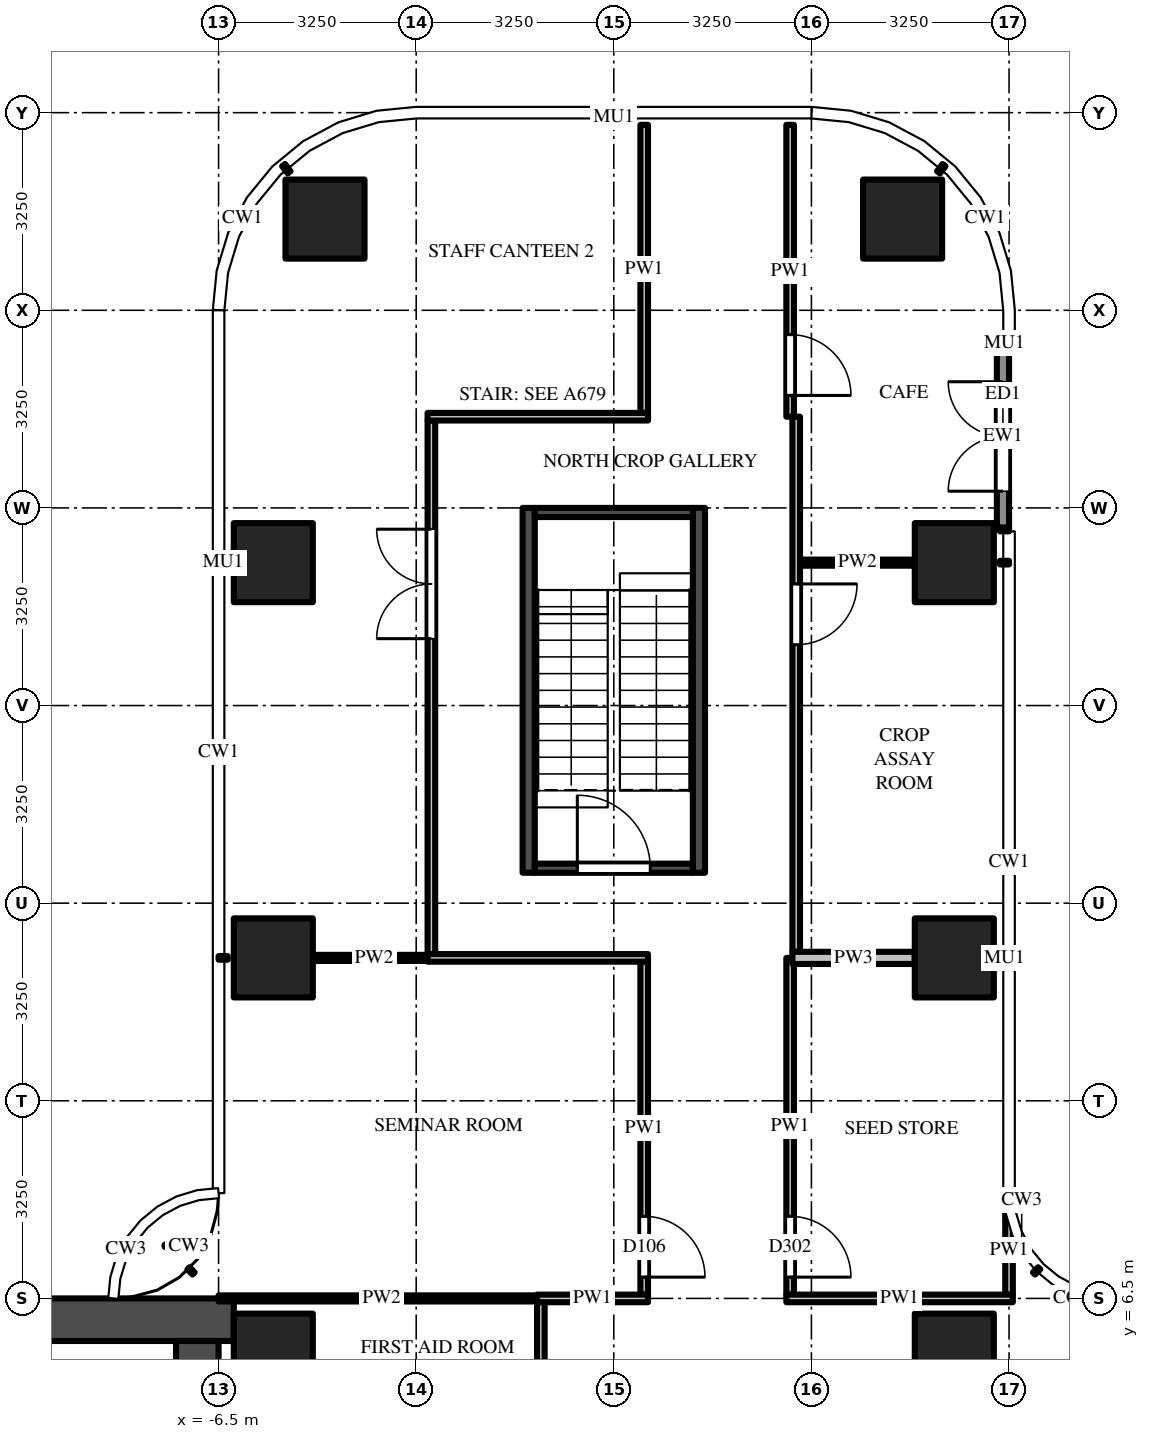
"""IFC4 building model, lengths in metres.
Left out: names, types, materials, properties, quantities, classifications, styles, units other than length and angle.
Written with IfcOpenShell. Run it as: python <this file> out.ifc"""

import sys

from ifc_helpers import new_model, si_unit, direction, frame, frame_2d, origin, origin_2d, place, context, subcontext, project, spatial, polyline, rectangle, outline, extrude, source, transform, mapped, element, fill, save


model = new_model("IFC4")
c1 = context("Model", 3, precision=1e-05, world=origin(), true_north=direction((0.0, 1.0)))
c2 = subcontext(c1, "Body", "Model", "MODEL_VIEW")
j1 = project(units=[si_unit("LENGTHUNIT", "METRE"), si_unit("PLANEANGLEUNIT", "RADIAN")], contexts=[c1])
p1 = place(None, origin())
s1 = spatial("IfcSite", under=j1, at=p1, CompositionType="ELEMENT")
p2 = place(p1, origin())
s2 = spatial("IfcBuilding", under=s1, at=p2, CompositionType="ELEMENT")
p3 = place(p2, frame((0.0, 0.0, 129.0)))
s3 = spatial("IfcBuildingStorey", under=s2, at=p3, CompositionType="ELEMENT", Elevation=129.0)
m1 = source(origin(), c2, "Body", "SweptSolid", [
    extrude(rectangle(XDim=1.3, YDim=1.3, at=origin_2d()), origin(), (0.0, 0.0, 1.0), 4.5),
])
for number, where, z_axis, x_axis in (
    (1, (-5.6, 12.1, 0.0), (0.0, 0.0, 1.0), (1.0, 0.0, 0.0)),
    (2, (-5.6, 18.6, 0.0), (0.0, 0.0, 1.0), (1.0, 0.0, 0.0)),
    (3, (-4.75, 24.25, 0.0), (0.0, 0.0, 1.0), (1.0, 0.0, 0.0)),
    (4, (5.6, 12.1, 0.0), (0.0, 0.0, 1.0), (1.0, 0.0, 0.0)),
    (5, (5.6, 18.6, 0.0), (0.0, 0.0, 1.0), (1.0, 0.0, 0.0)),
    (6, (4.75, 24.25, 0.0), (0.0, 0.0, 1.0), (1.0, 0.0, 0.0)),
    (7, (5.6, 5.6, 0.0), (0.0, 0.0, 1.0), (1.0, 0.0, 0.0)),
    (8, (-5.6, 5.6, 0.0), (0.0, 0.0, 1.0), (1.0, 0.0, 0.0)),
):
    element("IfcColumn", number, at=place(p3, frame(where, z_axis=z_axis, x_axis=x_axis)), inside=s3, PredefinedType="COLUMN", context=c2, shape_type="MappedRepresentation", body=[
        mapped(m1, transform((0.0, 0.0, 0.0))),
    ])
m2 = source(origin(), c2, "Body", "SweptSolid", [
    extrude(rectangle(XDim=16.5, YDim=0.7, at=frame_2d((8.25, 0.0))), origin(), (0.0, 0.0, 1.0), 4.25),
])
p4 = place(p3, frame((-6.25, 6.15, 0.0), z_axis=(0.0, 0.0, 1.0), x_axis=(-1.0, 0.0, 0.0)))
e9 = element("IfcWall", 9, at=p4, inside=s3, PredefinedType="SHEAR", context=c2, shape_type="MappedRepresentation", body=[
    mapped(m2, transform((0.0, 0.0, 0.0))),
])
m3 = source(origin(), c2, "Body", "SweptSolid", [
    extrude(rectangle(XDim=9.05, YDim=0.7, at=frame_2d((4.525, 0.0))), origin(), (0.0, 0.0, 1.0), 4.25),
])
p5 = place(p3, frame((-6.85, 5.8, 0.0), z_axis=(0.0, 0.0, 1.0), x_axis=(0.0, -1.0, 0.0)))
e10 = element("IfcWall", 10, at=p5, inside=s3, PredefinedType="SHEAR", context=c2, shape_type="MappedRepresentation", body=[
    mapped(m3, transform((0.0, 0.0, 0.0))),
])
m4 = source(origin(), c2, "Body", "SweptSolid", [
    extrude(rectangle(XDim=1.8, YDim=2.1, at=frame_2d((0.9, 1.05))), frame((0.0, 0.36, 0.0), z_axis=(0.0, -1.0, 0.0), x_axis=(1.0, 0.0, 0.0)), (0.0, 0.0, 1.0), 0.72),
])
p6 = place(p5, frame((3.15, 0.0, 0.0)))
e11 = element("IfcOpeningElement", 11, at=p6, cuts=e10, PredefinedType="OPENING", context=c2, shape_type="MappedRepresentation", body=[
    mapped(m4, transform((0.0, 0.0, 0.0))),
])
m5 = source(origin(), c2, "Body", "SweptSolid", [
    extrude(rectangle(XDim=6.0, YDim=0.2, at=frame_2d((3.0, 0.0))), origin(), (0.0, 0.0, 1.0), 4.25),
])
for number, where, z_axis, x_axis in (
    (12, (-1.4, 13.5, 0.0), (0.0, 0.0, 1.0), (0.0, 1.0, 0.0)),
    (13, (1.4, 13.5, 0.0), (0.0, 0.0, 1.0), (0.0, 1.0, 0.0)),
):
    element("IfcWall", number, at=place(p3, frame(where, z_axis=z_axis, x_axis=x_axis)), inside=s3, PredefinedType="SHEAR", context=c2, shape_type="MappedRepresentation", body=[
        mapped(m5, transform((0.0, 0.0, 0.0))),
    ])
m6 = source(origin(), c2, "Body", "SweptSolid", [
    extrude(rectangle(XDim=2.6, YDim=0.15, at=frame_2d((1.3, 0.0))), origin(), (0.0, 0.0, 1.0), 4.25),
])
p7 = place(p3, frame((-1.3, 13.575, 0.0), z_axis=(0.0, 0.0, 1.0), x_axis=(1.0, 0.0, 0.0)))
e14 = element("IfcWall", 14, at=p7, inside=s3, PredefinedType="SHEAR", context=c2, shape_type="MappedRepresentation", body=[
    mapped(m6, transform((0.0, 0.0, 0.0))),
])
m7 = source(origin(), c2, "Body", "SweptSolid", [
    extrude(rectangle(XDim=1.2, YDim=2.1, at=frame_2d((0.6, 1.05))), frame((0.0, 0.085, 0.0), z_axis=(0.0, -1.0, 0.0), x_axis=(1.0, 0.0, 0.0)), (0.0, 0.0, 1.0), 0.17),
])
p8 = place(p7, frame((0.7, 0.0, 0.0)))
e15 = element("IfcOpeningElement", 15, at=p8, cuts=e14, PredefinedType="OPENING", context=c2, shape_type="MappedRepresentation", body=[
    mapped(m7, transform((0.0, 0.0, 0.0))),
])
p9 = place(p3, frame((-1.3, 19.425, 0.0), z_axis=(0.0, 0.0, 1.0), x_axis=(1.0, 0.0, 0.0)))
e16 = element("IfcWall", 16, at=p9, inside=s3, PredefinedType="SHEAR", context=c2, shape_type="MappedRepresentation", body=[
    mapped(m6, transform((0.0, 0.0, 0.0))),
])
m8 = source(origin(), c2, "Body", "SweptSolid", [
    extrude(rectangle(XDim=3.0, YDim=0.2, at=frame_2d((1.5, 0.0))), origin(), (0.0, 0.0, 1.0), 4.25),
])
p10 = place(p3, frame((6.4, 19.175, 0.0), z_axis=(0.0, 0.0, 1.0), x_axis=(0.0, 1.0, 0.0)))
e17 = element("IfcWall", 17, at=p10, inside=s3, PredefinedType="SOLIDWALL", context=c2, shape_type="MappedRepresentation", body=[
    mapped(m8, transform((0.0, 0.0, 0.0))),
])
m9 = source(origin(), c2, "Body", "SweptSolid", [
    extrude(rectangle(XDim=1.8, YDim=2.4, at=frame_2d((0.9, 1.2))), frame((0.0, 0.11, 0.0), z_axis=(0.0, -1.0, 0.0), x_axis=(1.0, 0.0, 0.0)), (0.0, 0.0, 1.0), 0.22),
])
p11 = place(p10, frame((0.6, 0.0, 0.0)))
e18 = element("IfcOpeningElement", 18, at=p11, cuts=e17, PredefinedType="OPENING", context=c2, shape_type="MappedRepresentation", body=[
    mapped(m9, transform((0.0, 0.0, 0.0))),
])
p12 = place(p3, origin())
e19 = element("IfcWall", 19, at=p12, inside=s3, PredefinedType="USERDEFINED", context=c2, shape_type="SweptSolid", body=[
    extrude(outline(polyline([(-8.827, 23.302), (-8.426, 24.814), (-8.044, 25.32), (-7.565, 24.959), (-7.876, 24.547), (-8.222, 23.244), (-8.149, 22.181), (-8.113, 22.064), (-8.687, 21.888), (-8.743, 22.071), (-8.827, 23.302)])), origin(), (0.0, 0.0, 1.0), 0.5),
])
m10 = source(origin(), c2, "Body", "SweptSolid", [
    extrude(rectangle(XDim=8.788, YDim=0.125, at=frame_2d((4.394, 0.0))), origin(), (0.0, 0.0, 1.0), 3.468),
])
p13 = place(p3, frame((-3.0, 12.15, 0.0), z_axis=(0.0, 0.0, 1.0), x_axis=(0.0, 1.0, 0.0)))
e20 = element("IfcWall", 20, at=p13, inside=s3, PredefinedType="PARTITIONING", context=c2, shape_type="MappedRepresentation", body=[
    mapped(m10, transform((0.0, 0.0, 0.0))),
])
m11 = source(origin(), c2, "Body", "SweptSolid", [
    extrude(rectangle(XDim=1.8, YDim=2.1, at=frame_2d((0.9, 1.05))), frame((0.0, 0.073, 0.0), z_axis=(0.0, -1.0, 0.0), x_axis=(1.0, 0.0, 0.0)), (0.0, 0.0, 1.0), 0.145),
])
p14 = place(p13, frame((5.2, 0.0, 0.0)))
e21 = element("IfcOpeningElement", 21, at=p14, cuts=e20, PredefinedType="OPENING", context=c2, shape_type="MappedRepresentation", body=[
    mapped(m11, transform((0.0, 0.0, 0.0))),
])
m12 = source(origin(), c2, "Body", "SweptSolid", [
    extrude(rectangle(XDim=3.137, YDim=0.125, at=frame_2d((1.569, 0.0))), origin(), (0.0, 0.0, 1.0), 3.468),
])
p15 = place(p3, frame((-1.2, 6.45, 0.0), z_axis=(0.0, 0.0, 1.0), x_axis=(0.0, -1.0, 0.0)))
e22 = element("IfcWall", 22, at=p15, inside=s3, PredefinedType="PARTITIONING", context=c2, shape_type="MappedRepresentation", body=[
    mapped(m12, transform((0.0, 0.0, 0.0))),
])
m13 = source(origin(), c2, "Body", "SweptSolid", [
    extrude(rectangle(XDim=5.475, YDim=0.125, at=frame_2d((2.738, 0.0))), origin(), (0.0, 0.0, 1.0), 3.468),
])
p16 = place(p3, frame((0.5, 12.038, 0.0), z_axis=(0.0, 0.0, 1.0), x_axis=(0.0, -1.0, 0.0)))
e23 = element("IfcWall", 23, at=p16, inside=s3, PredefinedType="PARTITIONING", context=c2, shape_type="MappedRepresentation", body=[
    mapped(m13, transform((0.0, 0.0, 0.0))),
])
m14 = source(origin(), c2, "Body", "SweptSolid", [
    extrude(rectangle(XDim=1.0, YDim=2.1, at=frame_2d((0.5, 1.05))), frame((0.0, 0.073, 0.0), z_axis=(0.0, -1.0, 0.0), x_axis=(1.0, 0.0, 0.0)), (0.0, 0.0, 1.0), 0.145),
])
p17 = place(p16, frame((4.188, 0.0, 0.0)))
e24 = element("IfcOpeningElement", 24, at=p17, cuts=e23, PredefinedType="OPENING", context=c2, shape_type="MappedRepresentation", body=[
    mapped(m14, transform((0.0, 0.0, 0.0))),
])
m15 = source(origin(), c2, "Body", "SweptSolid", [
    extrude(rectangle(XDim=4.738, YDim=0.125, at=frame_2d((2.369, 0.0))), origin(), (0.0, 0.0, 1.0), 3.33),
])
p18 = place(p3, frame((0.5, 25.8, 0.0), z_axis=(0.0, 0.0, 1.0), x_axis=(0.0, -1.0, 0.0)))
e25 = element("IfcWall", 25, at=p18, inside=s3, PredefinedType="PARTITIONING", context=c2, shape_type="MappedRepresentation", body=[
    mapped(m15, transform((0.0, 0.0, 0.0))),
])
m16 = source(origin(), c2, "Body", "SweptSolid", [
    extrude(rectangle(XDim=5.538, YDim=0.125, at=frame_2d((2.769, 0.0))), origin(), (0.0, 0.0, 1.0), 3.468),
])
p19 = place(p3, frame((2.9, 12.1, 0.0), z_axis=(0.0, 0.0, 1.0), x_axis=(0.0, -1.0, 0.0)))
e26 = element("IfcWall", 26, at=p19, inside=s3, PredefinedType="PARTITIONING", context=c2, shape_type="MappedRepresentation", body=[
    mapped(m16, transform((0.0, 0.0, 0.0))),
])
p20 = place(p19, frame((4.25, 0.0, 0.0)))
e27 = element("IfcOpeningElement", 27, at=p20, cuts=e26, PredefinedType="OPENING", context=c2, shape_type="MappedRepresentation", body=[
    mapped(m14, transform((0.0, 0.0, 0.0))),
])
m17 = source(origin(), c2, "Body", "SweptSolid", [
    extrude(rectangle(XDim=4.8, YDim=0.125, at=frame_2d((2.4, 0.0))), origin(), (0.0, 0.0, 1.0), 3.33),
])
p21 = place(p3, frame((2.9, 25.8, 0.0), z_axis=(0.0, 0.0, 1.0), x_axis=(0.0, -1.0, 0.0)))
e28 = element("IfcWall", 28, at=p21, inside=s3, PredefinedType="PARTITIONING", context=c2, shape_type="MappedRepresentation", body=[
    mapped(m17, transform((0.0, 0.0, 0.0))),
])
p22 = place(p21, frame((3.45, 0.0, 0.0)))
e29 = element("IfcOpeningElement", 29, at=p22, cuts=e28, PredefinedType="OPENING", context=c2, shape_type="MappedRepresentation", body=[
    mapped(m14, transform((0.0, 0.0, 0.0))),
])
m18 = source(origin(), c2, "Body", "SweptSolid", [
    extrude(rectangle(XDim=8.8, YDim=0.125, at=frame_2d((4.4, 0.0))), origin(), (0.0, 0.0, 1.0), 3.468),
])
p23 = place(p3, frame((3.0, 21.0, 0.0), z_axis=(0.0, 0.0, 1.0), x_axis=(0.0, -1.0, 0.0)))
e30 = element("IfcWall", 30, at=p23, inside=s3, PredefinedType="PARTITIONING", context=c2, shape_type="MappedRepresentation", body=[
    mapped(m18, transform((0.0, 0.0, 0.0))),
])
p24 = place(p23, frame((2.75, 0.0, 0.0)))
e31 = element("IfcOpeningElement", 31, at=p24, cuts=e30, PredefinedType="OPENING", context=c2, shape_type="MappedRepresentation", body=[
    mapped(m14, transform((0.0, 0.0, 0.0))),
])
m19 = source(origin(), c2, "Body", "SweptSolid", [
    extrude(rectangle(XDim=1.469, YDim=0.125, at=frame_2d((0.734, 0.0))), origin(), (0.0, 0.0, 1.0), 4.25),
])
p25 = place(p3, frame((6.5, 6.562, 0.0), z_axis=(0.0, 0.0, 1.0), x_axis=(0.0, 1.0, 0.0)))
e32 = element("IfcWall", 32, at=p25, inside=s3, PredefinedType="PARTITIONING", context=c2, shape_type="MappedRepresentation", body=[
    mapped(m19, transform((0.0, 0.0, 0.0))),
])
m20 = source(origin(), c2, "Body", "SweptSolid", [
    extrude(rectangle(XDim=5.363, YDim=0.1, at=frame_2d((2.681, 0.0))), origin(), (0.0, 0.0, 1.0), 3.33),
])
p26 = place(p3, frame((-6.5, 6.5, 0.0), z_axis=(0.0, 0.0, 1.0), x_axis=(1.0, 0.0, 0.0)))
e33 = element("IfcWall", 33, at=p26, inside=s3, PredefinedType="PARTITIONING", context=c2, shape_type="MappedRepresentation", body=[
    mapped(m20, transform((0.0, 0.0, 0.0))),
])
m21 = source(origin(), c2, "Body", "SweptSolid", [
    extrude(rectangle(XDim=1.825, YDim=0.125, at=frame_2d((0.913, 0.0))), origin(), (0.0, 0.0, 1.0), 4.25),
])
p27 = place(p3, frame((-1.262, 6.5, 0.0), z_axis=(0.0, 0.0, 1.0), x_axis=(1.0, 0.0, 0.0)))
e34 = element("IfcWall", 34, at=p27, inside=s3, PredefinedType="PARTITIONING", context=c2, shape_type="MappedRepresentation", body=[
    mapped(m21, transform((0.0, 0.0, 0.0))),
])
m22 = source(origin(), c2, "Body", "SweptSolid", [
    extrude(rectangle(XDim=3.725, YDim=0.125, at=frame_2d((1.863, 0.0))), origin(), (0.0, 0.0, 1.0), 3.33),
])
p28 = place(p3, frame((2.837, 6.5, 0.0), z_axis=(0.0, 0.0, 1.0), x_axis=(1.0, 0.0, 0.0)))
e35 = element("IfcWall", 35, at=p28, inside=s3, PredefinedType="PARTITIONING", context=c2, shape_type="MappedRepresentation", body=[
    mapped(m22, transform((0.0, 0.0, 0.0))),
])
m23 = source(origin(), c2, "Body", "SweptSolid", [
    extrude(rectangle(XDim=2.012, YDim=0.2, at=frame_2d((1.006, 0.0))), origin(), (0.0, 0.0, 1.0), 3.468),
])
p29 = place(p3, frame((2.938, 12.1, 0.0), z_axis=(0.0, 0.0, 1.0), x_axis=(1.0, 0.0, 0.0)))
e36 = element("IfcWall", 36, at=p29, inside=s3, PredefinedType="PARTITIONING", context=c2, shape_type="MappedRepresentation", body=[
    mapped(m23, transform((0.0, 0.0, 0.0))),
])
m24 = source(origin(), c2, "Body", "SweptSolid", [
    extrude(rectangle(XDim=2.012, YDim=0.1, at=frame_2d((1.006, 0.0))), origin(), (0.0, 0.0, 1.0), 3.468),
])
p30 = place(p3, frame((-4.95, 12.1, 0.0), z_axis=(0.0, 0.0, 1.0), x_axis=(1.0, 0.0, 0.0)))
e37 = element("IfcWall", 37, at=p30, inside=s3, PredefinedType="PARTITIONING", context=c2, shape_type="MappedRepresentation", body=[
    mapped(m24, transform((0.0, 0.0, 0.0))),
])
m25 = source(origin(), c2, "Body", "SweptSolid", [
    extrude(rectangle(XDim=3.625, YDim=0.125, at=frame_2d((1.812, 0.0))), origin(), (0.0, 0.0, 1.0), 3.468),
])
p31 = place(p3, frame((0.562, 12.1, 0.0), z_axis=(0.0, 0.0, 1.0), x_axis=(-1.0, 0.0, 0.0)))
e38 = element("IfcWall", 38, at=p31, inside=s3, PredefinedType="PARTITIONING", context=c2, shape_type="MappedRepresentation", body=[
    mapped(m25, transform((0.0, 0.0, 0.0))),
])
m26 = source(origin(), c2, "Body", "SweptSolid", [
    extrude(rectangle(XDim=1.887, YDim=0.1, at=frame_2d((0.944, 0.0))), origin(), (0.0, 0.0, 1.0), 3.697),
])
p32 = place(p3, frame((3.062, 18.6, 0.0), z_axis=(0.0, 0.0, 1.0), x_axis=(1.0, 0.0, 0.0)))
e39 = element("IfcWall", 39, at=p32, inside=s3, PredefinedType="PARTITIONING", context=c2, shape_type="MappedRepresentation", body=[
    mapped(m26, transform((0.0, 0.0, 0.0))),
])
m27 = source(origin(), c2, "Body", "SweptSolid", [
    extrude(rectangle(XDim=3.625, YDim=0.125, at=frame_2d((1.812, 0.0))), origin(), (0.0, 0.0, 1.0), 4.25),
])
p33 = place(p3, frame((-3.062, 21.0, 0.0), z_axis=(0.0, 0.0, 1.0), x_axis=(1.0, 0.0, 0.0)))
e40 = element("IfcWall", 40, at=p33, inside=s3, PredefinedType="PARTITIONING", context=c2, shape_type="MappedRepresentation", body=[
    mapped(m27, transform((0.0, 0.0, 0.0))),
])
m28 = source(origin(), c2, "Body", "SweptSolid", [
    extrude(rectangle(XDim=1.2, YDim=2.1, at=frame_2d((0.6, 1.05))), frame((0.0, 0.025, 0.0), z_axis=(0.0, -1.0, 0.0), x_axis=(1.0, 0.0, 0.0)), (0.0, 0.0, 1.0), 0.05),
])
p34 = place(p8, origin())
e41 = element("IfcDoor", 41, at=p34, inside=s3, OperationType="SINGLE_SWING_LEFT", PredefinedType="DOOR", context=c2, shape_type="MappedRepresentation", body=[
    mapped(m28, transform((0.0, 0.0, 0.0))),
])
fill(e15, e41)
m29 = source(origin(), c2, "Body", "SweptSolid", [
    extrude(rectangle(XDim=1.8, YDim=2.4, at=frame_2d((0.9, 1.2))), frame((0.0, 0.025, 0.0), z_axis=(0.0, -1.0, 0.0), x_axis=(1.0, 0.0, 0.0)), (0.0, 0.0, 1.0), 0.05),
])
p35 = place(p11, origin())
e42 = element("IfcDoor", 42, at=p35, inside=s3, OperationType="DOUBLE_DOOR_SINGLE_SWING", PredefinedType="DOOR", context=c2, shape_type="MappedRepresentation", body=[
    mapped(m29, transform((0.0, 0.0, 0.0))),
])
fill(e18, e42)
m30 = source(origin(), c2, "Body", "SweptSolid", [
    extrude(rectangle(XDim=1.0, YDim=2.1, at=frame_2d((0.5, 1.05))), frame((0.0, 0.025, 0.0), z_axis=(0.0, -1.0, 0.0), x_axis=(1.0, 0.0, 0.0)), (0.0, 0.0, 1.0), 0.05),
])
p36 = place(p17, origin())
e43 = element("IfcDoor", 43, at=p36, inside=s3, OperationType="SINGLE_SWING_RIGHT", PredefinedType="DOOR", context=c2, shape_type="MappedRepresentation", body=[
    mapped(m30, transform((0.0, 0.0, 0.0))),
])
fill(e24, e43)
p37 = place(p20, origin())
e44 = element("IfcDoor", 44, at=p37, inside=s3, OperationType="SINGLE_SWING_RIGHT", PredefinedType="DOOR", context=c2, shape_type="MappedRepresentation", body=[
    mapped(m30, transform((0.0, 0.0, 0.0))),
])
fill(e27, e44)
p38 = place(p24, origin())
e45 = element("IfcDoor", 45, at=p38, inside=s3, OperationType="SINGLE_SWING_LEFT", PredefinedType="DOOR", context=c2, shape_type="MappedRepresentation", body=[
    mapped(m30, transform((0.0, 0.0, 0.0))),
])
fill(e31, e45)
m31 = source(origin(), c2, "Body", "SweptSolid", [
    extrude(rectangle(XDim=1.8, YDim=2.1, at=frame_2d((0.9, 1.05))), frame((0.0, 0.025, 0.0), z_axis=(0.0, -1.0, 0.0), x_axis=(1.0, 0.0, 0.0)), (0.0, 0.0, 1.0), 0.05),
])
p39 = place(p14, origin())
e46 = element("IfcDoor", 46, at=p39, inside=s3, OperationType="DOUBLE_DOOR_SINGLE_SWING", PredefinedType="DOOR", context=c2, shape_type="MappedRepresentation", body=[
    mapped(m31, transform((0.0, 0.0, 0.0))),
])
fill(e21, e46)
p40 = place(p22, origin())
e47 = element("IfcDoor", 47, at=p40, inside=s3, OperationType="SINGLE_SWING_RIGHT", PredefinedType="DOOR", context=c2, shape_type="MappedRepresentation", body=[
    mapped(m30, transform((0.0, 0.0, 0.0))),
])
fill(e29, e47)
save(model, sys.argv[1])
